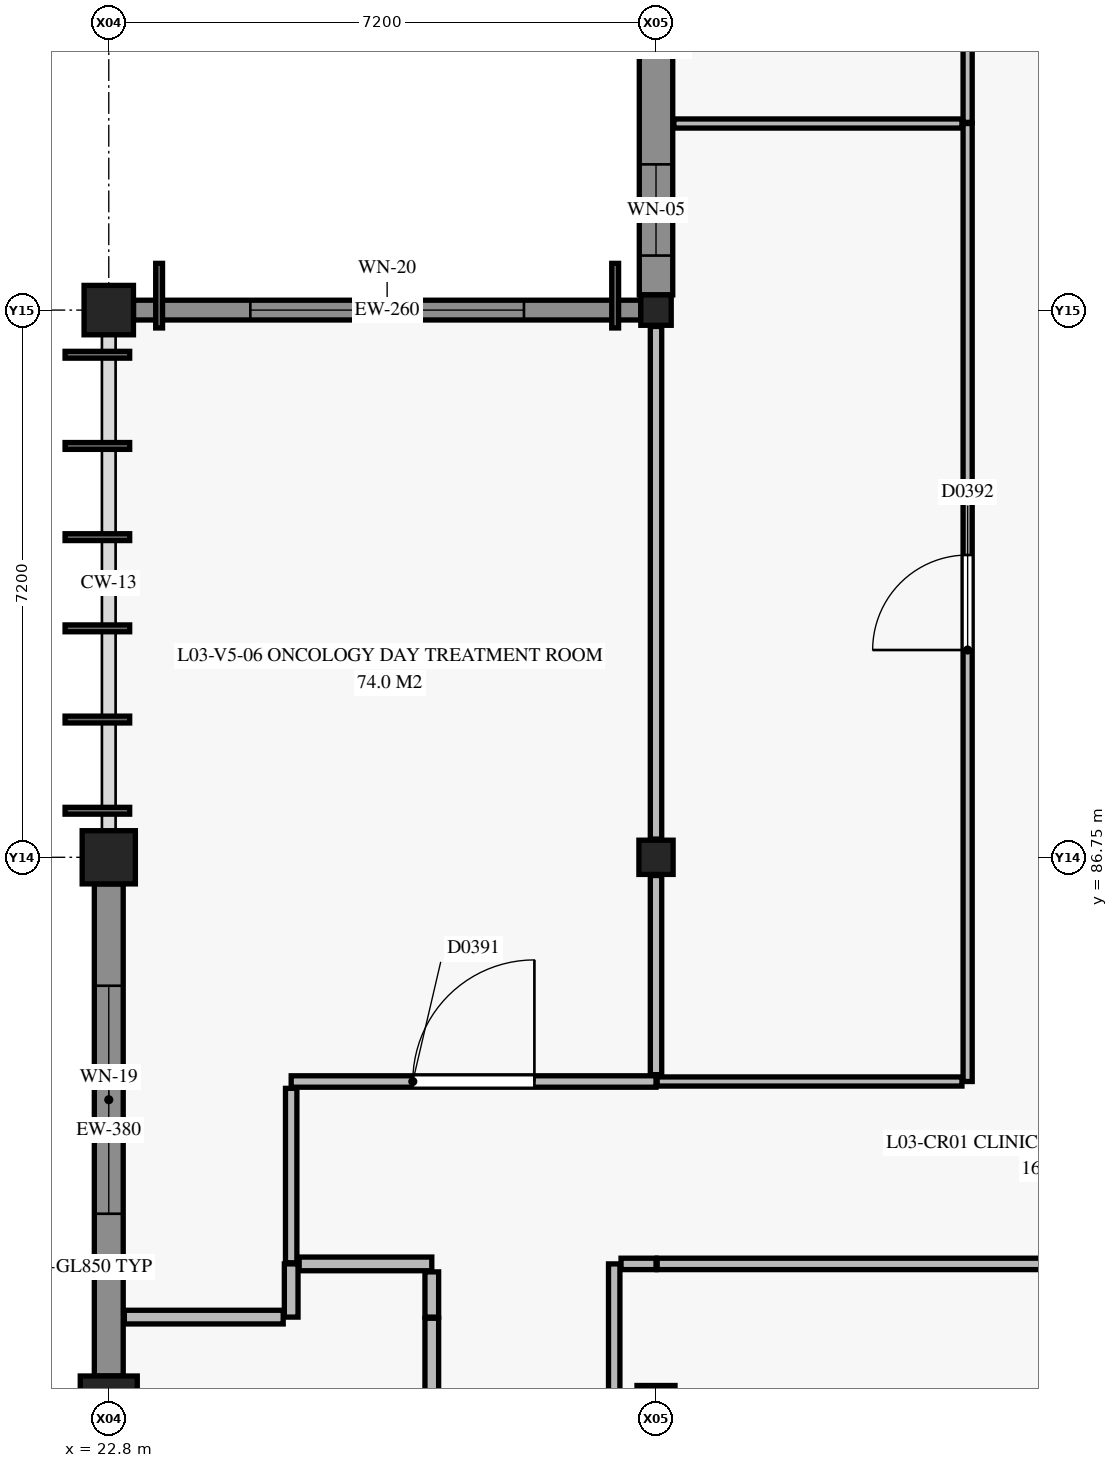
"""IFC4 building model, lengths in metres.
Left out: names, types, materials, properties, quantities, classifications, styles, units other than length and angle.
Written with IfcOpenShell. Run it as: python <this file> out.ifc"""

import sys

from ifc_helpers import new_model, si_unit, direction, frame, frame_2d, origin, origin_2d, place, context, subcontext, project, spatial, rectangle, extrude, element, fill, save


model = new_model("IFC4")
c1 = context("Model", 3, precision=1e-05, world=origin(), true_north=direction((0.0, 1.0)))
c2 = subcontext(c1, "Body", "Model", "MODEL_VIEW")
j1 = project(units=[si_unit("LENGTHUNIT", "METRE"), si_unit("PLANEANGLEUNIT", "RADIAN")], contexts=[c1])
p1 = place(None, origin())
s1 = spatial("IfcSite", under=j1, at=p1, CompositionType="ELEMENT")
p2 = place(p1, origin())
s2 = spatial("IfcBuilding", under=s1, at=p2, CompositionType="ELEMENT")
p3 = place(p2, frame((0.0, 0.0, 13.2)))
s3 = spatial("IfcBuildingStorey", under=s2, at=p3, CompositionType="ELEMENT", Elevation=13.2)
p4 = place(p3, frame((22.8, 79.55, 0.0), z_axis=(0.0, 0.0, 1.0), x_axis=(1.0, 0.0, 0.0)))
e1 = element("IfcColumn", 1, at=p4, inside=s3, PredefinedType="COLUMN", context=c2, shape_type="SweptSolid", body=[
    extrude(rectangle(XDim=0.75, YDim=0.75, at=origin_2d()), origin(), (0.0, 0.0, 1.0), 4.05),
])
p5 = place(p3, frame((22.8, 86.75, 0.0), z_axis=(0.0, 0.0, 1.0), x_axis=(1.0, 0.0, 0.0)))
e2 = element("IfcColumn", 2, at=p5, inside=s3, PredefinedType="COLUMN", context=c2, shape_type="SweptSolid", body=[
    extrude(rectangle(XDim=0.7, YDim=0.7, at=origin_2d()), origin(), (0.0, 0.0, 1.0), 4.05),
])
p6 = place(p3, frame((22.8, 93.95, 0.0), z_axis=(0.0, 0.0, 1.0), x_axis=(1.0, 0.0, 0.0)))
e3 = element("IfcColumn", 3, at=p6, inside=s3, PredefinedType="COLUMN", context=c2, shape_type="SweptSolid", body=[
    extrude(rectangle(XDim=0.65, YDim=0.65, at=origin_2d()), origin(), (0.0, 0.0, 1.0), 4.36),
])
p7 = place(p3, frame((30.0, 79.55, 0.0), z_axis=(0.0, 0.0, 1.0), x_axis=(1.0, 0.0, 0.0)))
e4 = element("IfcColumn", 4, at=p7, inside=s3, PredefinedType="COLUMN", context=c2, shape_type="SweptSolid", body=[
    extrude(rectangle(XDim=0.5, YDim=0.5, at=origin_2d()), origin(), (0.0, 0.0, 1.0), 4.05),
])
p8 = place(p3, frame((30.0, 86.75, 0.0), z_axis=(0.0, 0.0, 1.0), x_axis=(1.0, 0.0, 0.0)))
e5 = element("IfcColumn", 5, at=p8, inside=s3, PredefinedType="COLUMN", context=c2, shape_type="SweptSolid", body=[
    extrude(rectangle(XDim=0.45, YDim=0.45, at=origin_2d()), origin(), (0.0, 0.0, 1.0), 4.05),
])
p9 = place(p3, frame((30.0, 93.95, 0.0), z_axis=(0.0, 0.0, 1.0), x_axis=(1.0, 0.0, 0.0)))
e6 = element("IfcColumn", 6, at=p9, inside=s3, PredefinedType="COLUMN", context=c2, shape_type="SweptSolid", body=[
    extrude(rectangle(XDim=0.4, YDim=0.4, at=origin_2d()), origin(), (0.0, 0.0, 1.0), 4.05),
])
p10 = place(p3, frame((22.8, 79.925, 0.0), z_axis=(0.0, 0.0, 1.0), x_axis=(0.0, 1.0, 0.0)))
e7 = element("IfcWall", 7, at=p10, inside=s3, PredefinedType="USERDEFINED", context=c2, shape_type="SweptSolid", body=[
    extrude(rectangle(XDim=6.475, YDim=0.38, at=frame_2d((3.237, 0.0))), origin(), (0.0, 0.0, 1.0), 3.38),
])
p11 = place(p10, frame((2.135, 0.0, 0.6)))
e8 = element("IfcOpeningElement", 8, at=p11, cuts=e7, PredefinedType="OPENING", context=c2, shape_type="SweptSolid", body=[
    extrude(rectangle(XDim=3.0, YDim=2.2, at=frame_2d((1.5, 1.1))), frame((0.0, 0.2, 0.0), z_axis=(0.0, -1.0, 0.0), x_axis=(1.0, 0.0, 0.0)), (0.0, 0.0, 1.0), 0.4),
])
p12 = place(p3, frame((23.125, 93.95, 0.0), z_axis=(0.0, 0.0, 1.0), x_axis=(1.0, 0.0, 0.0)))
e9 = element("IfcWall", 9, at=p12, inside=s3, PredefinedType="SOLIDWALL", context=c2, shape_type="SweptSolid", body=[
    extrude(rectangle(XDim=6.675, YDim=0.26, at=frame_2d((3.337, 0.0))), origin(), (0.0, 0.0, 1.0), 3.38),
])
p13 = place(p12, frame((1.538, 0.0, 0.6)))
e10 = element("IfcOpeningElement", 10, at=p13, cuts=e9, PredefinedType="OPENING", context=c2, shape_type="SweptSolid", body=[
    extrude(rectangle(XDim=3.6, YDim=2.2, at=frame_2d((1.8, 1.1))), frame((0.0, 0.14, 0.0), z_axis=(0.0, -1.0, 0.0), x_axis=(1.0, 0.0, 0.0)), (0.0, 0.0, 1.0), 0.28),
])
p14 = place(p3, frame((30.0, 94.15, 0.0), z_axis=(0.0, 0.0, 1.0), x_axis=(0.0, 1.0, 0.0)))
e11 = element("IfcWall", 11, at=p14, inside=s3, PredefinedType="USERDEFINED", context=c2, shape_type="SweptSolid", body=[
    extrude(rectangle(XDim=6.55, YDim=0.44, at=frame_2d((3.275, 0.0))), origin(), (0.0, 0.0, 1.0), 3.38),
])
p15 = place(p14, frame((0.518, 0.0, 0.9)))
e12 = element("IfcOpeningElement", 12, at=p15, cuts=e11, PredefinedType="OPENING", context=c2, shape_type="SweptSolid", body=[
    extrude(rectangle(XDim=1.2, YDim=1.8, at=frame_2d((0.6, 0.9))), frame((0.0, 0.23, 0.0), z_axis=(0.0, -1.0, 0.0), x_axis=(1.0, 0.0, 0.0)), (0.0, 0.0, 1.0), 0.46),
])
p16 = place(p14, frame((3.528, 0.0, 0.9)))
e13 = element("IfcOpeningElement", 13, at=p16, cuts=e11, PredefinedType="OPENING", context=c2, shape_type="SweptSolid", body=[
    extrude(rectangle(XDim=1.4, YDim=1.8, at=frame_2d((0.7, 0.9))), frame((0.0, 0.23, 0.0), z_axis=(0.0, -1.0, 0.0), x_axis=(1.0, 0.0, 0.0)), (0.0, 0.0, 1.0), 0.46),
])
p17 = place(p3, frame((25.2, 80.7, 0.0), z_axis=(0.0, 0.0, 1.0), x_axis=(0.0, 1.0, 0.0)))
e14 = element("IfcWall", 14, at=p17, inside=s3, PredefinedType="PLUMBINGWALL", context=c2, shape_type="SweptSolid", body=[
    extrude(rectangle(XDim=0.7, YDim=0.18, at=frame_2d((0.35, 0.0))), origin(), (0.0, 0.0, 1.0), 3.95),
])
p18 = place(p3, frame((25.305, 81.4, 0.0), z_axis=(0.0, 0.0, 1.0), x_axis=(1.0, 0.0, 0.0)))
e15 = element("IfcWall", 15, at=p18, inside=s3, PredefinedType="PLUMBINGWALL", context=c2, shape_type="SweptSolid", body=[
    extrude(rectangle(XDim=1.745, YDim=0.18, at=frame_2d((0.873, 0.0))), origin(), (0.0, 0.0, 1.0), 3.95),
])
p19 = place(p3, frame((27.05, 80.7, 0.0), z_axis=(0.0, 0.0, 1.0), x_axis=(0.0, 1.0, 0.0)))
e16 = element("IfcWall", 16, at=p19, inside=s3, PredefinedType="PLUMBINGWALL", context=c2, shape_type="SweptSolid", body=[
    extrude(rectangle(XDim=0.595, YDim=0.18, at=frame_2d((0.297, 0.0))), origin(), (0.0, 0.0, 1.0), 3.95),
])
p20 = place(p3, frame((27.05, 76.165, 0.0), z_axis=(0.0, 0.0, 1.0), x_axis=(0.0, 1.0, 0.0)))
e17 = element("IfcWall", 17, at=p20, inside=s3, PredefinedType="PLUMBINGWALL", context=c2, shape_type="SweptSolid", body=[
    extrude(rectangle(XDim=4.52, YDim=0.18, at=frame_2d((2.26, 0.0))), origin(), (0.0, 0.0, 1.0), 3.22),
])
p21 = place(p20, frame((1.785, 0.0, 0.0)))
e18 = element("IfcOpeningElement", 18, at=p21, cuts=e17, PredefinedType="OPENING", context=c2, shape_type="SweptSolid", body=[
    extrude(rectangle(XDim=0.95, YDim=2.1, at=frame_2d((0.475, 1.05))), frame((0.0, 0.1, 0.0), z_axis=(0.0, -1.0, 0.0), x_axis=(1.0, 0.0, 0.0)), (0.0, 0.0, 1.0), 0.2),
])
p22 = place(p3, frame((29.45, 70.0, 0.0), z_axis=(0.0, 0.0, 1.0), x_axis=(0.0, 1.0, 0.0)))
e19 = element("IfcWall", 19, at=p22, inside=s3, PredefinedType="PARTITIONING", context=c2, shape_type="SweptSolid", body=[
    extrude(rectangle(XDim=11.4, YDim=0.15, at=frame_2d((5.7, 0.0))), origin(), (0.0, 0.0, 1.0), 3.22),
])
p23 = place(p22, frame((5.125, 0.0, 0.0)))
e20 = element("IfcOpeningElement", 20, at=p23, cuts=e19, PredefinedType="OPENING", context=c2, shape_type="SweptSolid", body=[
    extrude(rectangle(XDim=1.15, YDim=2.15, at=frame_2d((0.575, 1.075))), frame((0.0, 0.085, 0.0), z_axis=(0.0, -1.0, 0.0), x_axis=(1.0, 0.0, 0.0)), (0.0, 0.0, 1.0), 0.17),
])
p24 = place(p3, frame((29.54, 81.4, 0.0), z_axis=(0.0, 0.0, 1.0), x_axis=(1.0, 0.0, 0.0)))
e21 = element("IfcWall", 21, at=p24, inside=s3, PredefinedType="PARTITIONING", context=c2, shape_type="SweptSolid", body=[
    extrude(rectangle(XDim=0.46, YDim=0.15, at=frame_2d((0.23, 0.0))), origin(), (0.0, 0.0, 1.0), 3.95),
])
p25 = place(p3, frame((30.015, 81.4, 0.0), z_axis=(0.0, 0.0, 1.0), x_axis=(1.0, 0.0, 0.0)))
e22 = element("IfcWall", 22, at=p25, inside=s3, PredefinedType="PARTITIONING", context=c2, shape_type="SweptSolid", body=[
    extrude(rectangle(XDim=7.185, YDim=0.15, at=frame_2d((3.593, 0.0))), origin(), (0.0, 0.0, 1.0), 3.95),
])
p26 = place(p3, frame((25.2, 83.8, 0.0), z_axis=(0.0, 0.0, 1.0), x_axis=(1.0, 0.0, 0.0)))
e23 = element("IfcWall", 23, at=p26, inside=s3, PredefinedType="PARTITIONING", context=c2, shape_type="SweptSolid", body=[
    extrude(rectangle(XDim=4.8, YDim=0.15, at=frame_2d((2.4, 0.0))), origin(), (0.0, 0.0, 1.0), 3.95),
])
p27 = place(p26, frame((1.6, 0.0, 0.0)))
e24 = element("IfcOpeningElement", 24, at=p27, cuts=e23, PredefinedType="OPENING", context=c2, shape_type="SweptSolid", body=[
    extrude(rectangle(XDim=1.6, YDim=2.25, at=frame_2d((0.8, 1.125))), frame((0.0, 0.085, 0.0), z_axis=(0.0, -1.0, 0.0), x_axis=(1.0, 0.0, 0.0)), (0.0, 0.0, 1.0), 0.17),
])
p28 = place(p3, frame((25.2, 81.415, 0.0), z_axis=(0.0, 0.0, 1.0), x_axis=(0.0, 1.0, 0.0)))
e25 = element("IfcWall", 25, at=p28, inside=s3, PredefinedType="PARTITIONING", context=c2, shape_type="SweptSolid", body=[
    extrude(rectangle(XDim=2.295, YDim=0.15, at=frame_2d((1.147, 0.0))), origin(), (0.0, 0.0, 1.0), 3.95),
])
p29 = place(p3, frame((34.1, 83.8, 0.0), z_axis=(0.0, 0.0, 1.0), x_axis=(0.0, 1.0, 0.0)))
e26 = element("IfcWall", 26, at=p29, inside=s3, PredefinedType="PARTITIONING", context=c2, shape_type="SweptSolid", body=[
    extrude(rectangle(XDim=12.605, YDim=0.12, at=frame_2d((6.302, 0.0))), origin(), (0.0, 0.0, 1.0), 3.22),
])
p30 = place(p29, frame((5.677, 0.0, 0.0)))
e27 = element("IfcOpeningElement", 27, at=p30, cuts=e26, PredefinedType="OPENING", context=c2, shape_type="SweptSolid", body=[
    extrude(rectangle(XDim=1.25, YDim=2.15, at=frame_2d((0.625, 1.075))), frame((0.0, 0.07, 0.0), z_axis=(0.0, -1.0, 0.0), x_axis=(1.0, 0.0, 0.0)), (0.0, 0.0, 1.0), 0.14),
])
p31 = place(p3, frame((30.015, 83.8, 0.0), z_axis=(0.0, 0.0, 1.0), x_axis=(1.0, 0.0, 0.0)))
e28 = element("IfcWall", 28, at=p31, inside=s3, PredefinedType="PARTITIONING", context=c2, shape_type="SweptSolid", body=[
    extrude(rectangle(XDim=4.01, YDim=0.12, at=frame_2d((2.005, 0.0))), origin(), (0.0, 0.0, 1.0), 3.95),
])
p32 = place(p3, frame((34.1, 96.42, 0.0), z_axis=(0.0, 0.0, 1.0), x_axis=(0.0, 1.0, 0.0)))
e29 = element("IfcWall", 29, at=p32, inside=s3, PredefinedType="PARTITIONING", context=c2, shape_type="SweptSolid", body=[
    extrude(rectangle(XDim=3.93, YDim=0.12, at=frame_2d((1.965, 0.0))), origin(), (0.0, 0.0, 1.0), 3.95),
])
p33 = place(p32, frame((1.49, 0.0, 0.0)))
e30 = element("IfcOpeningElement", 30, at=p33, cuts=e29, PredefinedType="OPENING", context=c2, shape_type="SweptSolid", body=[
    extrude(rectangle(XDim=0.95, YDim=2.1, at=frame_2d((0.475, 1.05))), frame((0.0, 0.07, 0.0), z_axis=(0.0, -1.0, 0.0), x_axis=(1.0, 0.0, 0.0)), (0.0, 0.0, 1.0), 0.14),
])
p34 = place(p3, frame((23.005, 80.7, 0.0), z_axis=(0.0, 0.0, 1.0), x_axis=(1.0, 0.0, 0.0)))
e31 = element("IfcWall", 31, at=p34, inside=s3, PredefinedType="PLUMBINGWALL", context=c2, shape_type="SweptSolid", body=[
    extrude(rectangle(XDim=2.09, YDim=0.18, at=frame_2d((1.045, 0.0))), origin(), (0.0, 0.0, 1.0), 3.95),
])
p35 = place(p3, frame((30.0, 83.89, 0.0), z_axis=(0.0, 0.0, 1.0), x_axis=(0.0, 1.0, 0.0)))
e32 = element("IfcWall", 32, at=p35, inside=s3, PredefinedType="PARTITIONING", context=c2, shape_type="SweptSolid", body=[
    extrude(rectangle(XDim=2.62, YDim=0.15, at=frame_2d((1.31, 0.0))), origin(), (0.0, 0.0, 1.0), 3.95),
])
p36 = place(p3, frame((30.0, 86.99, 0.0), z_axis=(0.0, 0.0, 1.0), x_axis=(0.0, 1.0, 0.0)))
e33 = element("IfcWall", 33, at=p36, inside=s3, PredefinedType="PARTITIONING", context=c2, shape_type="SweptSolid", body=[
    extrude(rectangle(XDim=6.745, YDim=0.15, at=frame_2d((3.373, 0.0))), origin(), (0.0, 0.0, 1.0), 3.95),
])
p37 = place(p3, frame((30.235, 96.405, 0.0), z_axis=(0.0, 0.0, 1.0), x_axis=(1.0, 0.0, 0.0)))
e34 = element("IfcWall", 34, at=p37, inside=s3, PredefinedType="PARTITIONING", context=c2, shape_type="SweptSolid", body=[
    extrude(rectangle(XDim=3.79, YDim=0.12, at=frame_2d((1.895, 0.0))), origin(), (0.0, 0.0, 1.0), 3.95),
])
p38 = place(p11, origin())
e35 = element("IfcWindow", 35, at=p38, inside=s3, PartitioningType="SINGLE_PANEL", PredefinedType="WINDOW", context=c2, shape_type="SweptSolid", body=[
    extrude(rectangle(XDim=3.0, YDim=2.2, at=frame_2d((1.5, 1.1))), frame((0.0, 0.03, 0.0), z_axis=(0.0, -1.0, 0.0), x_axis=(1.0, 0.0, 0.0)), (0.0, 0.0, 1.0), 0.06),
])
fill(e8, e35)
p39 = place(p13, origin())
e36 = element("IfcWindow", 36, at=p39, inside=s3, PartitioningType="SINGLE_PANEL", PredefinedType="WINDOW", context=c2, shape_type="SweptSolid", body=[
    extrude(rectangle(XDim=3.6, YDim=2.2, at=frame_2d((1.8, 1.1))), frame((0.0, 0.03, 0.0), z_axis=(0.0, -1.0, 0.0), x_axis=(1.0, 0.0, 0.0)), (0.0, 0.0, 1.0), 0.06),
])
fill(e10, e36)
p40 = place(p15, origin())
e37 = element("IfcWindow", 37, at=p40, inside=s3, PartitioningType="SINGLE_PANEL", PredefinedType="WINDOW", context=c2, shape_type="SweptSolid", body=[
    extrude(rectangle(XDim=1.2, YDim=1.8, at=frame_2d((0.6, 0.9))), frame((0.0, 0.03, 0.0), z_axis=(0.0, -1.0, 0.0), x_axis=(1.0, 0.0, 0.0)), (0.0, 0.0, 1.0), 0.06),
])
fill(e12, e37)
p41 = place(p27, origin())
e38 = element("IfcDoor", 38, at=p41, inside=s3, OperationType="SINGLE_SWING_RIGHT", PredefinedType="DOOR", context=c2, shape_type="SweptSolid", body=[
    extrude(rectangle(XDim=1.6, YDim=2.25, at=frame_2d((0.8, 1.125))), frame((0.0, 0.025, 0.0), z_axis=(0.0, -1.0, 0.0), x_axis=(1.0, 0.0, 0.0)), (0.0, 0.0, 1.0), 0.05),
])
fill(e24, e38)
p42 = place(p30, origin())
e39 = element("IfcDoor", 39, at=p42, inside=s3, OperationType="SINGLE_SWING_LEFT", PredefinedType="DOOR", context=c2, shape_type="SweptSolid", body=[
    extrude(rectangle(XDim=1.25, YDim=2.15, at=frame_2d((0.625, 1.075))), frame((0.0, 0.025, 0.0), z_axis=(0.0, -1.0, 0.0), x_axis=(1.0, 0.0, 0.0)), (0.0, 0.0, 1.0), 0.05),
])
fill(e27, e39)
save(model, sys.argv[1])
